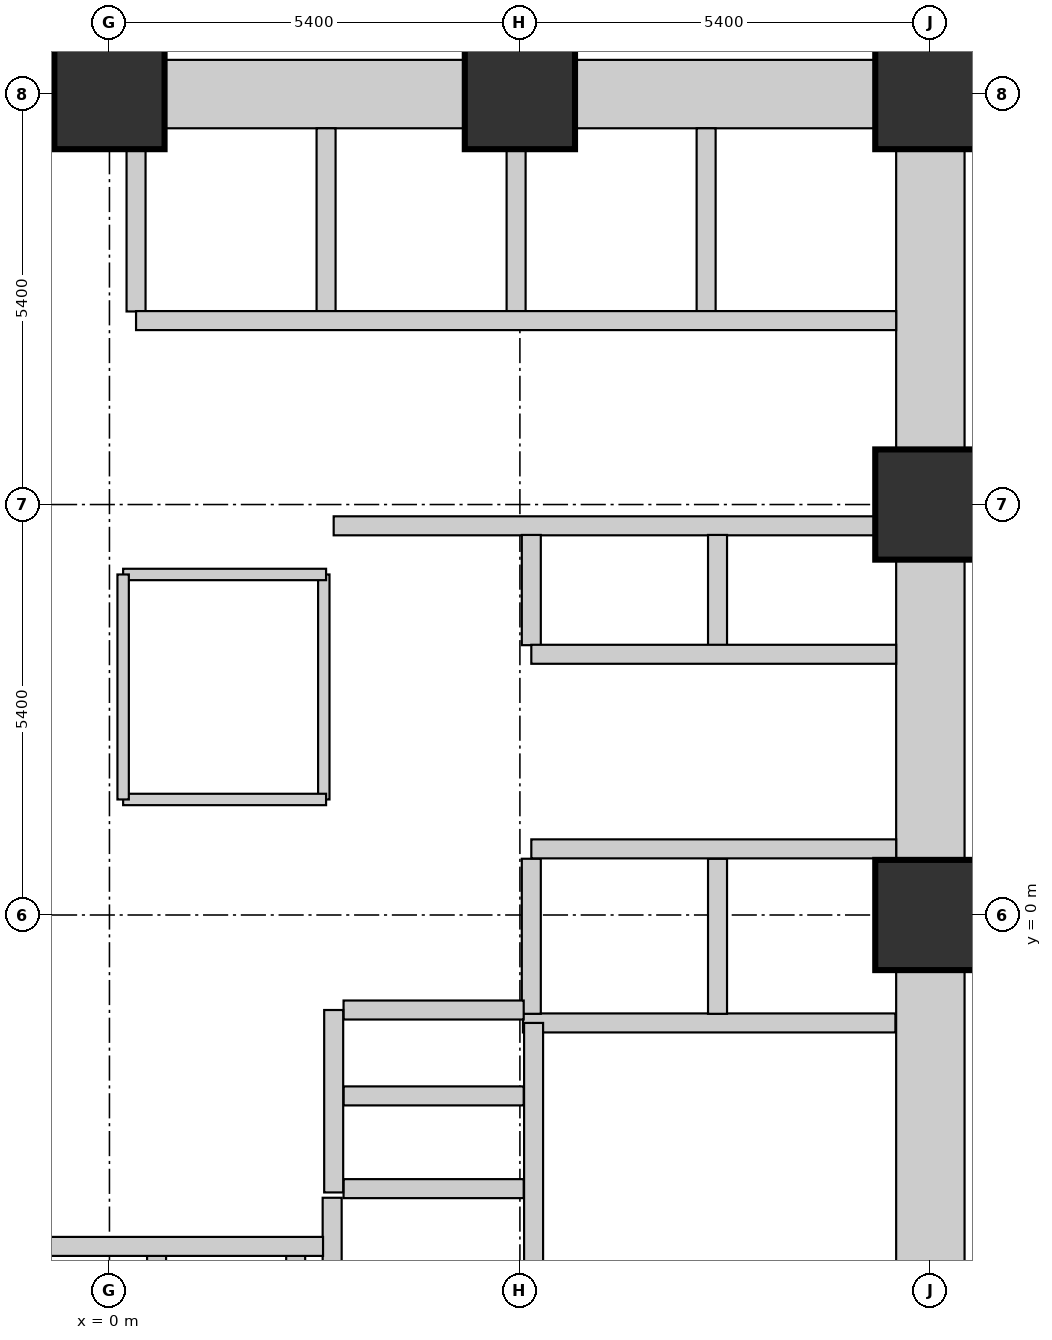
"""IFC4 building model, lengths in metres.
Left out: names, types, materials, properties, quantities, classifications, styles, units other than length and angle.
Written with IfcOpenShell. Run it as: python <this file> out.ifc"""

import sys

from ifc_helpers import new_model, si_unit, direction, frame, frame_2d, origin, origin_2d, place, context, subcontext, project, spatial, rectangle, extrude, element, fill, save


model = new_model("IFC4")
c1 = context("Model", 3, precision=1e-05, world=origin(), true_north=direction((0.0, 1.0)))
c2 = subcontext(c1, "Body", "Model", "MODEL_VIEW")
j1 = project(units=[si_unit("LENGTHUNIT", "METRE"), si_unit("PLANEANGLEUNIT", "RADIAN")], contexts=[c1])
p1 = place(None, origin())
s1 = spatial("IfcSite", under=j1, at=p1, CompositionType="ELEMENT")
p2 = place(p1, origin())
s2 = spatial("IfcBuilding", under=s1, at=p2, CompositionType="ELEMENT")
p3 = place(p2, origin())
s3 = spatial("IfcBuildingStorey", under=s2, at=p3, CompositionType="ELEMENT", Elevation=0.0)
for number, where, z_axis, x_axis in (
    (1, (0.0, 10.8, 0.0), (0.0, 0.0, 1.0), (1.0, 0.0, 0.0)),
    (2, (5.4, 10.8, 0.0), (0.0, 0.0, 1.0), (1.0, 0.0, 0.0)),
    (3, (10.8, 0.0, 0.0), (0.0, 0.0, 1.0), (1.0, 0.0, 0.0)),
    (4, (10.8, 5.4, 0.0), (0.0, 0.0, 1.0), (1.0, 0.0, 0.0)),
    (5, (10.8, 10.8, 0.0), (0.0, 0.0, 1.0), (1.0, 0.0, 0.0)),
):
    element("IfcColumn", number, at=place(p3, frame(where, z_axis=z_axis, x_axis=x_axis)), inside=s3, PredefinedType="COLUMN", context=c2, shape_type="SweptSolid", body=[
        extrude(rectangle(XDim=1.45, YDim=1.45, at=origin_2d()), origin(), (0.0, 0.0, 1.0), 4.5),
    ])
p4 = place(p3, frame((-4.665, 10.8, 0.0), z_axis=(0.0, 0.0, 1.0), x_axis=(1.0, 0.0, 0.0)))
e6 = element("IfcWall", 6, at=p4, inside=s3, PredefinedType="SHEAR", context=c2, shape_type="SweptSolid", body=[
    extrude(rectangle(XDim=3.93, YDim=0.9, at=frame_2d((1.965, 0.0))), origin(), (0.0, 0.0, 1.0), 4.5),
])
p5 = place(p4, frame((2.58, 0.0, 0.0)))
e7 = element("IfcOpeningElement", 7, at=p5, cuts=e6, PredefinedType="OPENING", context=c2, shape_type="SweptSolid", body=[
    extrude(rectangle(XDim=1.1, YDim=2.1, at=frame_2d((0.55, 1.05))), frame((0.0, 0.46, 0.0), z_axis=(0.0, -1.0, 0.0), x_axis=(1.0, 0.0, 0.0)), (0.0, 0.0, 1.0), 0.92),
])
p6 = place(p3, frame((10.8, -4.665, 0.0), z_axis=(0.0, 0.0, 1.0), x_axis=(0.0, 1.0, 0.0)))
e8 = element("IfcWall", 8, at=p6, inside=s3, PredefinedType="SHEAR", context=c2, shape_type="SweptSolid", body=[
    extrude(rectangle(XDim=3.93, YDim=0.9, at=frame_2d((1.965, 0.0))), origin(), (0.0, 0.0, 1.0), 4.5),
])
p7 = place(p6, frame((1.415, 0.0, 0.0)))
e9 = element("IfcOpeningElement", 9, at=p7, cuts=e8, PredefinedType="OPENING", context=c2, shape_type="SweptSolid", body=[
    extrude(rectangle(XDim=1.1, YDim=2.1, at=frame_2d((0.55, 1.05))), frame((0.0, 0.46, 0.0), z_axis=(0.0, -1.0, 0.0), x_axis=(1.0, 0.0, 0.0)), (0.0, 0.0, 1.0), 0.92),
])
p8 = place(p3, frame((0.735, 10.8, 0.0), z_axis=(0.0, 0.0, 1.0), x_axis=(1.0, 0.0, 0.0)))
e10 = element("IfcWall", 10, at=p8, inside=s3, PredefinedType="SHEAR", context=c2, shape_type="SweptSolid", body=[
    extrude(rectangle(XDim=3.93, YDim=0.9, at=frame_2d((1.965, 0.0))), origin(), (0.0, 0.0, 1.0), 4.5),
])
p9 = place(p3, frame((10.8, 0.735, 0.0), z_axis=(0.0, 0.0, 1.0), x_axis=(0.0, 1.0, 0.0)))
e11 = element("IfcWall", 11, at=p9, inside=s3, PredefinedType="SHEAR", context=c2, shape_type="SweptSolid", body=[
    extrude(rectangle(XDim=3.93, YDim=0.9, at=frame_2d((1.965, 0.0))), origin(), (0.0, 0.0, 1.0), 4.5),
])
p10 = place(p9, frame((1.415, 0.0, 0.0)))
e12 = element("IfcOpeningElement", 12, at=p10, cuts=e11, PredefinedType="OPENING", context=c2, shape_type="SweptSolid", body=[
    extrude(rectangle(XDim=1.1, YDim=2.1, at=frame_2d((0.55, 1.05))), frame((0.0, 0.46, 0.0), z_axis=(0.0, -1.0, 0.0), x_axis=(1.0, 0.0, 0.0)), (0.0, 0.0, 1.0), 0.92),
])
for number, where, z_axis, x_axis in (
    (13, (6.135, 10.8, 0.0), (0.0, 0.0, 1.0), (1.0, 0.0, 0.0)),
    (14, (10.8, 6.135, 0.0), (0.0, 0.0, 1.0), (0.0, 1.0, 0.0)),
):
    element("IfcWall", number, at=place(p3, frame(where, z_axis=z_axis, x_axis=x_axis)), inside=s3, PredefinedType="SHEAR", context=c2, shape_type="SweptSolid", body=[
        extrude(rectangle(XDim=3.93, YDim=0.9, at=frame_2d((1.965, 0.0))), origin(), (0.0, 0.0, 1.0), 4.5),
    ])
p11 = place(p3, frame((2.93, -6.51, 0.0), z_axis=(0.0, 0.0, 1.0), x_axis=(0.0, 1.0, 0.0)))
e15 = element("IfcWall", 15, at=p11, inside=s3, PredefinedType="SHEAR", context=c2, shape_type="SweptSolid", body=[
    extrude(rectangle(XDim=2.79, YDim=0.25, at=frame_2d((1.395, 0.0))), origin(), (0.0, 0.0, 1.0), 4.5),
])
p12 = place(p3, frame((5.44, -1.42, 0.0), z_axis=(0.0, 0.0, 1.0), x_axis=(1.0, 0.0, 0.0)))
e16 = element("IfcWall", 16, at=p12, inside=s3, PredefinedType="SHEAR", context=c2, shape_type="SweptSolid", body=[
    extrude(rectangle(XDim=4.9, YDim=0.25, at=frame_2d((2.45, 0.0))), origin(), (0.0, 0.0, 1.0), 4.5),
])
p13 = place(p3, frame((3.08, -3.6, 0.0), z_axis=(0.0, 0.0, 1.0), x_axis=(1.0, 0.0, 0.0)))
e17 = element("IfcWall", 17, at=p13, inside=s3, PredefinedType="SHEAR", context=c2, shape_type="SweptSolid", body=[
    extrude(rectangle(XDim=2.37, YDim=0.25, at=frame_2d((1.185, 0.0))), origin(), (0.0, 0.0, 1.0), 4.5),
])
p14 = place(p3, frame((5.58, -6.51, 0.0), z_axis=(0.0, 0.0, 1.0), x_axis=(0.0, 1.0, 0.0)))
e18 = element("IfcWall", 18, at=p14, inside=s3, PredefinedType="SHEAR", context=c2, shape_type="SweptSolid", body=[
    extrude(rectangle(XDim=5.09, YDim=0.25, at=frame_2d((2.545, 0.0))), origin(), (0.0, 0.0, 1.0), 4.5),
])
p15 = place(p14, frame((0.85, 0.0, 0.0)))
e19 = element("IfcOpeningElement", 19, at=p15, cuts=e18, PredefinedType="OPENING", context=c2, shape_type="SweptSolid", body=[
    extrude(rectangle(XDim=1.1, YDim=2.1, at=frame_2d((0.55, 1.05))), frame((0.0, 0.135, 0.0), z_axis=(0.0, -1.0, 0.0), x_axis=(1.0, 0.0, 0.0)), (0.0, 0.0, 1.0), 0.27),
])
for number, where, z_axis, x_axis in (
    (20, (0.62, -6.34, 0.0), (0.0, 0.0, 1.0), (0.0, 1.0, 0.0)),
    (21, (2.45, -6.34, 0.0), (0.0, 0.0, 1.0), (0.0, 1.0, 0.0)),
):
    element("IfcWall", number, at=place(p3, frame(where, z_axis=z_axis, x_axis=x_axis)), inside=s3, PredefinedType="SHEAR", context=c2, shape_type="SweptSolid", body=[
        extrude(rectangle(XDim=1.88, YDim=0.25, at=frame_2d((0.94, 0.0))), origin(), (0.0, 0.0, 1.0), 4.5),
    ])
p16 = place(p3, frame((-1.22, -4.36, 0.0), z_axis=(0.0, 0.0, 1.0), x_axis=(1.0, 0.0, 0.0)))
e22 = element("IfcWall", 22, at=p16, inside=s3, PredefinedType="SHEAR", context=c2, shape_type="SweptSolid", body=[
    extrude(rectangle(XDim=4.03, YDim=0.25, at=frame_2d((2.015, 0.0))), origin(), (0.0, 0.0, 1.0), 4.5),
])
p17 = place(p3, frame((2.85, 7.94, 0.0), z_axis=(0.0, 0.0, 1.0), x_axis=(0.0, 1.0, 0.0)))
e23 = element("IfcWall", 23, at=p17, inside=s3, PredefinedType="SHEAR", context=c2, shape_type="SweptSolid", body=[
    extrude(rectangle(XDim=2.41, YDim=0.25, at=frame_2d((1.205, 0.0))), origin(), (0.0, 0.0, 1.0), 4.5),
])
for number, where, z_axis, x_axis in (
    (24, (0.35, 7.94, 0.0), (0.0, 0.0, 1.0), (0.0, 1.0, 0.0)),
    (25, (5.35, 7.94, 0.0), (0.0, 0.0, 1.0), (0.0, 1.0, 0.0)),
):
    element("IfcWall", number, at=place(p3, frame(where, z_axis=z_axis, x_axis=x_axis)), inside=s3, PredefinedType="SHEAR", context=c2, shape_type="SweptSolid", body=[
        extrude(rectangle(XDim=2.135, YDim=0.25, at=frame_2d((1.067, 0.0))), origin(), (0.0, 0.0, 1.0), 4.5),
    ])
p18 = place(p3, frame((7.85, 7.94, 0.0), z_axis=(0.0, 0.0, 1.0), x_axis=(0.0, 1.0, 0.0)))
e26 = element("IfcWall", 26, at=p18, inside=s3, PredefinedType="SHEAR", context=c2, shape_type="SweptSolid", body=[
    extrude(rectangle(XDim=2.41, YDim=0.25, at=frame_2d((1.205, 0.0))), origin(), (0.0, 0.0, 1.0), 4.5),
])
p19 = place(p3, frame((0.35, 7.82, 0.0), z_axis=(0.0, 0.0, 1.0), x_axis=(1.0, 0.0, 0.0)))
e27 = element("IfcWall", 27, at=p19, inside=s3, PredefinedType="SHEAR", context=c2, shape_type="SweptSolid", body=[
    extrude(rectangle(XDim=10.0, YDim=0.25, at=frame_2d((5.0, 0.0))), origin(), (0.0, 0.0, 1.0), 4.5),
])
p20 = place(p19, frame((0.7, 0.0, 0.0)))
e28 = element("IfcOpeningElement", 28, at=p20, cuts=e27, PredefinedType="OPENING", context=c2, shape_type="SweptSolid", body=[
    extrude(rectangle(XDim=1.1, YDim=2.1, at=frame_2d((0.55, 1.05))), frame((0.0, 0.135, 0.0), z_axis=(0.0, -1.0, 0.0), x_axis=(1.0, 0.0, 0.0)), (0.0, 0.0, 1.0), 0.27),
])
p21 = place(p19, frame((3.2, 0.0, 0.0)))
e29 = element("IfcOpeningElement", 29, at=p21, cuts=e27, PredefinedType="OPENING", context=c2, shape_type="SweptSolid", body=[
    extrude(rectangle(XDim=1.1, YDim=2.1, at=frame_2d((0.55, 1.05))), frame((0.0, 0.135, 0.0), z_axis=(0.0, -1.0, 0.0), x_axis=(1.0, 0.0, 0.0)), (0.0, 0.0, 1.0), 0.27),
])
p22 = place(p19, frame((5.7, 0.0, 0.0)))
e30 = element("IfcOpeningElement", 30, at=p22, cuts=e27, PredefinedType="OPENING", context=c2, shape_type="SweptSolid", body=[
    extrude(rectangle(XDim=1.1, YDim=2.1, at=frame_2d((0.55, 1.05))), frame((0.0, 0.135, 0.0), z_axis=(0.0, -1.0, 0.0), x_axis=(1.0, 0.0, 0.0)), (0.0, 0.0, 1.0), 0.27),
])
p23 = place(p19, frame((8.2, 0.0, 0.0)))
e31 = element("IfcOpeningElement", 31, at=p23, cuts=e27, PredefinedType="OPENING", context=c2, shape_type="SweptSolid", body=[
    extrude(rectangle(XDim=1.1, YDim=2.1, at=frame_2d((0.55, 1.05))), frame((0.0, 0.135, 0.0), z_axis=(0.0, -1.0, 0.0), x_axis=(1.0, 0.0, 0.0)), (0.0, 0.0, 1.0), 0.27),
])
p24 = place(p3, frame((2.95, 5.12, 0.0), z_axis=(0.0, 0.0, 1.0), x_axis=(1.0, 0.0, 0.0)))
e32 = element("IfcWall", 32, at=p24, inside=s3, PredefinedType="SHEAR", context=c2, shape_type="SweptSolid", body=[
    extrude(rectangle(XDim=7.125, YDim=0.25, at=frame_2d((3.562, 0.0))), origin(), (0.0, 0.0, 1.0), 4.5),
])
for number, where, z_axis, x_axis in (
    (33, (5.55, 3.55, 0.0), (0.0, 0.0, 1.0), (0.0, 1.0, 0.0)),
    (34, (8.0, 3.55, 0.0), (0.0, 0.0, 1.0), (0.0, 1.0, 0.0)),
):
    element("IfcWall", number, at=place(p3, frame(where, z_axis=z_axis, x_axis=x_axis)), inside=s3, PredefinedType="SHEAR", context=c2, shape_type="SweptSolid", body=[
        extrude(rectangle(XDim=1.45, YDim=0.25, at=frame_2d((0.725, 0.0))), origin(), (0.0, 0.0, 1.0), 4.5),
    ])
for number, where, z_axis, x_axis in (
    (35, (5.55, -1.3, 0.0), (0.0, 0.0, 1.0), (0.0, 1.0, 0.0)),
    (36, (8.0, -1.3, 0.0), (0.0, 0.0, 1.0), (0.0, 1.0, 0.0)),
):
    element("IfcWall", number, at=place(p3, frame(where, z_axis=z_axis, x_axis=x_axis)), inside=s3, PredefinedType="SHEAR", context=c2, shape_type="SweptSolid", body=[
        extrude(rectangle(XDim=2.04, YDim=0.25, at=frame_2d((1.02, 0.0))), origin(), (0.0, 0.0, 1.0), 4.5),
    ])
p25 = place(p3, frame((5.55, 3.43, 0.0), z_axis=(0.0, 0.0, 1.0), x_axis=(1.0, 0.0, 0.0)))
e37 = element("IfcWall", 37, at=p25, inside=s3, PredefinedType="SHEAR", context=c2, shape_type="SweptSolid", body=[
    extrude(rectangle(XDim=4.8, YDim=0.25, at=frame_2d((2.4, 0.0))), origin(), (0.0, 0.0, 1.0), 4.5),
])
p26 = place(p25, frame((0.65, 0.0, 0.0)))
e38 = element("IfcOpeningElement", 38, at=p26, cuts=e37, PredefinedType="OPENING", context=c2, shape_type="SweptSolid", body=[
    extrude(rectangle(XDim=1.1, YDim=2.1, at=frame_2d((0.55, 1.05))), frame((0.0, 0.135, 0.0), z_axis=(0.0, -1.0, 0.0), x_axis=(1.0, 0.0, 0.0)), (0.0, 0.0, 1.0), 0.27),
])
p27 = place(p25, frame((3.05, 0.0, 0.0)))
e39 = element("IfcOpeningElement", 39, at=p27, cuts=e37, PredefinedType="OPENING", context=c2, shape_type="SweptSolid", body=[
    extrude(rectangle(XDim=1.1, YDim=2.1, at=frame_2d((0.55, 1.05))), frame((0.0, 0.135, 0.0), z_axis=(0.0, -1.0, 0.0), x_axis=(1.0, 0.0, 0.0)), (0.0, 0.0, 1.0), 0.27),
])
p28 = place(p3, frame((5.55, 0.87, 0.0), z_axis=(0.0, 0.0, 1.0), x_axis=(1.0, 0.0, 0.0)))
e40 = element("IfcWall", 40, at=p28, inside=s3, PredefinedType="SHEAR", context=c2, shape_type="SweptSolid", body=[
    extrude(rectangle(XDim=4.8, YDim=0.25, at=frame_2d((2.4, 0.0))), origin(), (0.0, 0.0, 1.0), 4.5),
])
p29 = place(p28, frame((0.65, 0.0, 0.0)))
e41 = element("IfcOpeningElement", 41, at=p29, cuts=e40, PredefinedType="OPENING", context=c2, shape_type="SweptSolid", body=[
    extrude(rectangle(XDim=1.1, YDim=2.1, at=frame_2d((0.55, 1.05))), frame((0.0, 0.135, 0.0), z_axis=(0.0, -1.0, 0.0), x_axis=(1.0, 0.0, 0.0)), (0.0, 0.0, 1.0), 0.27),
])
p30 = place(p28, frame((3.05, 0.0, 0.0)))
e42 = element("IfcOpeningElement", 42, at=p30, cuts=e40, PredefinedType="OPENING", context=c2, shape_type="SweptSolid", body=[
    extrude(rectangle(XDim=1.1, YDim=2.1, at=frame_2d((0.55, 1.05))), frame((0.0, 0.135, 0.0), z_axis=(0.0, -1.0, 0.0), x_axis=(1.0, 0.0, 0.0)), (0.0, 0.0, 1.0), 0.27),
])
for number, where, z_axis, x_axis in (
    (43, (3.08, -2.38, 0.0), (0.0, 0.0, 1.0), (1.0, 0.0, 0.0)),
    (44, (3.08, -1.25, 0.0), (0.0, 0.0, 1.0), (1.0, 0.0, 0.0)),
):
    element("IfcWall", number, at=place(p3, frame(where, z_axis=z_axis, x_axis=x_axis)), inside=s3, PredefinedType="SHEAR", context=c2, shape_type="SweptSolid", body=[
        extrude(rectangle(XDim=2.37, YDim=0.25, at=frame_2d((1.185, 0.0))), origin(), (0.0, 0.0, 1.0), 4.5),
    ])
p31 = place(p3, frame((2.95, -3.65, 0.0), z_axis=(0.0, 0.0, 1.0), x_axis=(0.0, 1.0, 0.0)))
e45 = element("IfcWall", 45, at=p31, inside=s3, PredefinedType="SHEAR", context=c2, shape_type="SweptSolid", body=[
    extrude(rectangle(XDim=2.4, YDim=0.25, at=frame_2d((1.2, 0.0))), origin(), (0.0, 0.0, 1.0), 4.5),
])
p32 = place(p31, frame((0.775, 0.0, 0.0)))
e46 = element("IfcOpeningElement", 46, at=p32, cuts=e45, PredefinedType="OPENING", context=c2, shape_type="SweptSolid", body=[
    extrude(rectangle(XDim=0.85, YDim=2.1, at=frame_2d((0.425, 1.05))), frame((0.0, 0.135, 0.0), z_axis=(0.0, -1.0, 0.0), x_axis=(1.0, 0.0, 0.0)), (0.0, 0.0, 1.0), 0.27),
])
p33 = place(p3, frame((2.82, 1.52, 0.0), z_axis=(0.0, 0.0, 1.0), x_axis=(0.0, 1.0, 0.0)))
e47 = element("IfcWall", 47, at=p33, inside=s3, PredefinedType="PARTITIONING", context=c2, shape_type="SweptSolid", body=[
    extrude(rectangle(XDim=2.96, YDim=0.15, at=frame_2d((1.48, 0.0))), origin(), (0.0, 0.0, 1.0), 4.2),
])
for number, where, z_axis, x_axis in (
    (48, (0.18, 4.48, 0.0), (0.0, 0.0, 1.0), (1.0, 0.0, 0.0)),
    (49, (0.18, 1.52, 0.0), (0.0, 0.0, 1.0), (1.0, 0.0, 0.0)),
):
    element("IfcWall", number, at=place(p3, frame(where, z_axis=z_axis, x_axis=x_axis)), inside=s3, PredefinedType="PARTITIONING", context=c2, shape_type="SweptSolid", body=[
        extrude(rectangle(XDim=2.67, YDim=0.15, at=frame_2d((1.335, 0.0))), origin(), (0.0, 0.0, 1.0), 4.2),
    ])
p34 = place(p3, frame((0.18, 1.52, 0.0), z_axis=(0.0, 0.0, 1.0), x_axis=(0.0, 1.0, 0.0)))
e50 = element("IfcWall", 50, at=p34, inside=s3, PredefinedType="PARTITIONING", context=c2, shape_type="SweptSolid", body=[
    extrude(rectangle(XDim=2.96, YDim=0.15, at=frame_2d((1.48, 0.0))), origin(), (0.0, 0.0, 1.0), 4.2),
])
p35 = place(p34, frame((0.95, 0.0, 0.0)))
e51 = element("IfcOpeningElement", 51, at=p35, cuts=e50, PredefinedType="OPENING", context=c2, shape_type="SweptSolid", body=[
    extrude(rectangle(XDim=0.85, YDim=2.1, at=frame_2d((0.425, 1.05))), frame((0.0, 0.085, 0.0), z_axis=(0.0, -1.0, 0.0), x_axis=(1.0, 0.0, 0.0)), (0.0, 0.0, 1.0), 0.17),
])
p36 = place(p3, frame((10.85, 0.0, 0.0), z_axis=(0.0, 0.0, 1.0), x_axis=(1.0, 0.0, 0.0)))
e52 = element("IfcWall", 52, at=p36, inside=s3, PredefinedType="PARTITIONING", context=c2, shape_type="SweptSolid", body=[
    extrude(rectangle(XDim=10.71, YDim=0.2, at=frame_2d((5.355, 0.0))), origin(), (0.0, 0.0, 1.0), 2.205),
])
p37 = place(p36, frame((2.25, 0.0, 0.0)))
e53 = element("IfcOpeningElement", 53, at=p37, cuts=e52, PredefinedType="OPENING", context=c2, shape_type="SweptSolid", body=[
    extrude(rectangle(XDim=1.1, YDim=2.1, at=frame_2d((0.55, 1.05))), frame((0.0, 0.11, 0.0), z_axis=(0.0, -1.0, 0.0), x_axis=(1.0, 0.0, 0.0)), (0.0, 0.0, 1.0), 0.22),
])
p38 = place(p35, origin())
e54 = element("IfcDoor", 54, at=p38, inside=s3, OperationType="SINGLE_SWING_RIGHT", PredefinedType="DOOR", context=c2, shape_type="SweptSolid", body=[
    extrude(rectangle(XDim=0.85, YDim=2.1, at=frame_2d((0.425, 1.05))), frame((0.0, 0.025, 0.0), z_axis=(0.0, -1.0, 0.0), x_axis=(1.0, 0.0, 0.0)), (0.0, 0.0, 1.0), 0.05),
])
fill(e51, e54)
p39 = place(p32, origin())
e55 = element("IfcDoor", 55, at=p39, inside=s3, OperationType="SINGLE_SWING_LEFT", PredefinedType="DOOR", context=c2, shape_type="SweptSolid", body=[
    extrude(rectangle(XDim=0.85, YDim=2.1, at=frame_2d((0.425, 1.05))), frame((0.0, 0.025, 0.0), z_axis=(0.0, -1.0, 0.0), x_axis=(1.0, 0.0, 0.0)), (0.0, 0.0, 1.0), 0.05),
])
fill(e46, e55)
p40 = place(p7, origin())
e56 = element("IfcDoor", 56, at=p40, inside=s3, OperationType="SINGLE_SWING_RIGHT", PredefinedType="DOOR", context=c2, shape_type="SweptSolid", body=[
    extrude(rectangle(XDim=1.1, YDim=2.1, at=frame_2d((0.55, 1.05))), frame((0.0, 0.025, 0.0), z_axis=(0.0, -1.0, 0.0), x_axis=(1.0, 0.0, 0.0)), (0.0, 0.0, 1.0), 0.05),
])
fill(e9, e56)
p41 = place(p20, origin())
e57 = element("IfcDoor", 57, at=p41, inside=s3, OperationType="SLIDING_TO_LEFT", PredefinedType="DOOR", context=c2, shape_type="SweptSolid", body=[
    extrude(rectangle(XDim=1.1, YDim=2.1, at=frame_2d((0.55, 1.05))), frame((0.0, 0.025, 0.0), z_axis=(0.0, -1.0, 0.0), x_axis=(1.0, 0.0, 0.0)), (0.0, 0.0, 1.0), 0.05),
])
fill(e28, e57)
p42 = place(p21, origin())
e58 = element("IfcDoor", 58, at=p42, inside=s3, OperationType="SLIDING_TO_LEFT", PredefinedType="DOOR", context=c2, shape_type="SweptSolid", body=[
    extrude(rectangle(XDim=1.1, YDim=2.1, at=frame_2d((0.55, 1.05))), frame((0.0, 0.025, 0.0), z_axis=(0.0, -1.0, 0.0), x_axis=(1.0, 0.0, 0.0)), (0.0, 0.0, 1.0), 0.05),
])
fill(e29, e58)
p43 = place(p22, origin())
e59 = element("IfcDoor", 59, at=p43, inside=s3, OperationType="SLIDING_TO_LEFT", PredefinedType="DOOR", context=c2, shape_type="SweptSolid", body=[
    extrude(rectangle(XDim=1.1, YDim=2.1, at=frame_2d((0.55, 1.05))), frame((0.0, 0.025, 0.0), z_axis=(0.0, -1.0, 0.0), x_axis=(1.0, 0.0, 0.0)), (0.0, 0.0, 1.0), 0.05),
])
fill(e30, e59)
p44 = place(p23, origin())
e60 = element("IfcDoor", 60, at=p44, inside=s3, OperationType="SLIDING_TO_LEFT", PredefinedType="DOOR", context=c2, shape_type="SweptSolid", body=[
    extrude(rectangle(XDim=1.1, YDim=2.1, at=frame_2d((0.55, 1.05))), frame((0.0, 0.025, 0.0), z_axis=(0.0, -1.0, 0.0), x_axis=(1.0, 0.0, 0.0)), (0.0, 0.0, 1.0), 0.05),
])
fill(e31, e60)
p45 = place(p26, origin())
e61 = element("IfcDoor", 61, at=p45, inside=s3, OperationType="SLIDING_TO_RIGHT", PredefinedType="DOOR", context=c2, shape_type="SweptSolid", body=[
    extrude(rectangle(XDim=1.1, YDim=2.1, at=frame_2d((0.55, 1.05))), frame((0.0, 0.025, 0.0), z_axis=(0.0, -1.0, 0.0), x_axis=(1.0, 0.0, 0.0)), (0.0, 0.0, 1.0), 0.05),
])
fill(e38, e61)
p46 = place(p27, origin())
e62 = element("IfcDoor", 62, at=p46, inside=s3, OperationType="SLIDING_TO_RIGHT", PredefinedType="DOOR", context=c2, shape_type="SweptSolid", body=[
    extrude(rectangle(XDim=1.1, YDim=2.1, at=frame_2d((0.55, 1.05))), frame((0.0, 0.025, 0.0), z_axis=(0.0, -1.0, 0.0), x_axis=(1.0, 0.0, 0.0)), (0.0, 0.0, 1.0), 0.05),
])
fill(e39, e62)
p47 = place(p29, origin())
e63 = element("IfcDoor", 63, at=p47, inside=s3, OperationType="SLIDING_TO_RIGHT", PredefinedType="DOOR", context=c2, shape_type="SweptSolid", body=[
    extrude(rectangle(XDim=1.1, YDim=2.1, at=frame_2d((0.55, 1.05))), frame((0.0, 0.025, 0.0), z_axis=(0.0, -1.0, 0.0), x_axis=(1.0, 0.0, 0.0)), (0.0, 0.0, 1.0), 0.05),
])
fill(e41, e63)
p48 = place(p30, origin())
e64 = element("IfcDoor", 64, at=p48, inside=s3, OperationType="SLIDING_TO_RIGHT", PredefinedType="DOOR", context=c2, shape_type="SweptSolid", body=[
    extrude(rectangle(XDim=1.1, YDim=2.1, at=frame_2d((0.55, 1.05))), frame((0.0, 0.025, 0.0), z_axis=(0.0, -1.0, 0.0), x_axis=(1.0, 0.0, 0.0)), (0.0, 0.0, 1.0), 0.05),
])
fill(e42, e64)
p49 = place(p10, origin())
e65 = element("IfcDoor", 65, at=p49, inside=s3, OperationType="SINGLE_SWING_LEFT", PredefinedType="DOOR", context=c2, shape_type="SweptSolid", body=[
    extrude(rectangle(XDim=1.1, YDim=2.1, at=frame_2d((0.55, 1.05))), frame((0.0, 0.025, 0.0), z_axis=(0.0, -1.0, 0.0), x_axis=(1.0, 0.0, 0.0)), (0.0, 0.0, 1.0), 0.05),
])
fill(e12, e65)
save(model, sys.argv[1])
